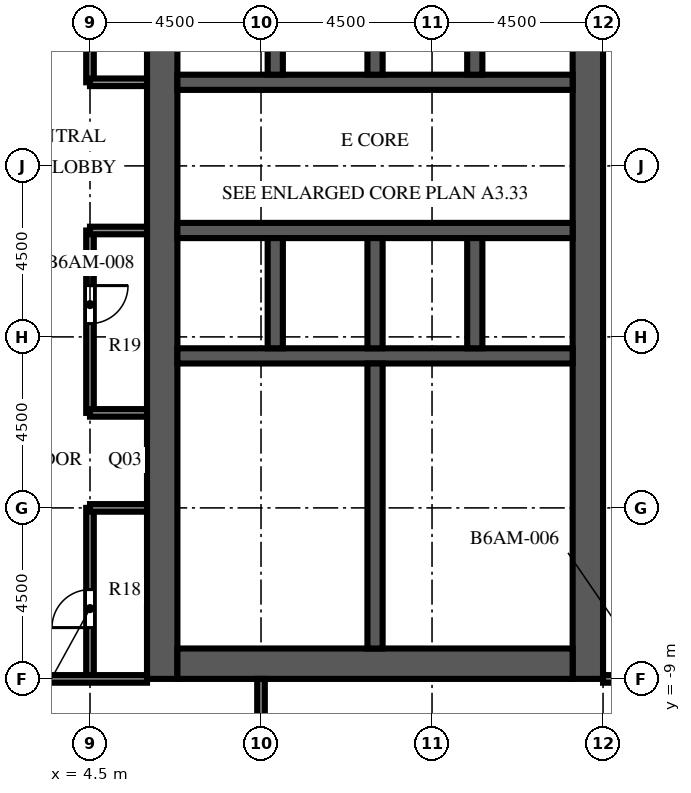
"""IFC4 building model, lengths in metres.
Left out: names, types, materials, properties, quantities, classifications, styles, units other than length and angle.
Written with IfcOpenShell. Run it as: python <this file> out.ifc"""

import sys

from ifc_helpers import new_model, si_unit, direction, frame, frame_2d, origin, place, context, subcontext, project, spatial, rectangle, extrude, element, fill, save


model = new_model("IFC4")
c1 = context("Model", 3, precision=1e-05, world=origin(), true_north=direction((0.0, 1.0)))
c2 = subcontext(c1, "Body", "Model", "MODEL_VIEW")
j1 = project(units=[si_unit("LENGTHUNIT", "METRE"), si_unit("PLANEANGLEUNIT", "RADIAN")], contexts=[c1])
p1 = place(None, origin())
s1 = spatial("IfcSite", under=j1, at=p1, CompositionType="ELEMENT")
p2 = place(p1, origin())
s2 = spatial("IfcBuilding", under=s1, at=p2, CompositionType="ELEMENT")
p3 = place(p2, frame((0.0, 0.0, 220.2)))
s3 = spatial("IfcBuildingStorey", under=s2, at=p3, CompositionType="ELEMENT", Elevation=220.2)
p4 = place(p3, frame((6.4, -9.0, 0.0), z_axis=(0.0, 0.0, 1.0), x_axis=(0.0, 1.0, 0.0)))
e1 = element("IfcWall", 1, at=p4, inside=s3, PredefinedType="SHEAR", context=c2, shape_type="SweptSolid", body=[
    extrude(rectangle(XDim=27.5, YDim=0.8, at=frame_2d((13.75, 0.0))), origin(), (0.0, 0.0, 1.0), 6.0),
])
p5 = place(p4, frame((12.55, 0.0, 0.0)))
e2 = element("IfcOpeningElement", 2, at=p5, cuts=e1, PredefinedType="OPENING", context=c2, shape_type="SweptSolid", body=[
    extrude(rectangle(XDim=2.4, YDim=2.4, at=frame_2d((1.2, 1.2))), frame((0.0, 0.41, 0.0), z_axis=(0.0, -1.0, 0.0), x_axis=(1.0, 0.0, 0.0)), (0.0, 0.0, 1.0), 0.82),
])
p6 = place(p4, frame((5.5, 0.0, 0.0)))
e3 = element("IfcOpeningElement", 3, at=p6, cuts=e1, PredefinedType="OPENING", context=c2, shape_type="SweptSolid", body=[
    extrude(rectangle(XDim=0.95, YDim=2.1, at=frame_2d((0.475, 1.05))), frame((0.0, 0.41, 0.0), z_axis=(0.0, -1.0, 0.0), x_axis=(1.0, 0.0, 0.0)), (0.0, 0.0, 1.0), 0.82),
])
p7 = place(p4, frame((23.475, 0.0, 0.0)))
e4 = element("IfcOpeningElement", 4, at=p7, cuts=e1, PredefinedType="OPENING", context=c2, shape_type="SweptSolid", body=[
    extrude(rectangle(XDim=1.2, YDim=2.1, at=frame_2d((0.6, 1.05))), frame((0.0, 0.41, 0.0), z_axis=(0.0, -1.0, 0.0), x_axis=(1.0, 0.0, 0.0)), (0.0, 0.0, 1.0), 0.82),
])
p8 = place(p3, frame((17.6, -9.0, 0.0), z_axis=(0.0, 0.0, 1.0), x_axis=(0.0, 1.0, 0.0)))
e5 = element("IfcWall", 5, at=p8, inside=s3, PredefinedType="SHEAR", context=c2, shape_type="SweptSolid", body=[
    extrude(rectangle(XDim=27.5, YDim=0.8, at=frame_2d((13.75, 0.0))), origin(), (0.0, 0.0, 1.0), 6.0),
])
p9 = place(p8, frame((12.55, 0.0, 0.0)))
e6 = element("IfcOpeningElement", 6, at=p9, cuts=e5, PredefinedType="OPENING", context=c2, shape_type="SweptSolid", body=[
    extrude(rectangle(XDim=2.4, YDim=2.4, at=frame_2d((1.2, 1.2))), frame((0.0, 0.41, 0.0), z_axis=(0.0, -1.0, 0.0), x_axis=(1.0, 0.0, 0.0)), (0.0, 0.0, 1.0), 0.82),
])
p10 = place(p8, frame((6.825, 0.0, 0.0)))
e7 = element("IfcOpeningElement", 7, at=p10, cuts=e5, PredefinedType="OPENING", context=c2, shape_type="SweptSolid", body=[
    extrude(rectangle(XDim=1.2, YDim=2.1, at=frame_2d((0.6, 1.05))), frame((0.0, 0.41, 0.0), z_axis=(0.0, -1.0, 0.0), x_axis=(1.0, 0.0, 0.0)), (0.0, 0.0, 1.0), 0.82),
])
p11 = place(p8, frame((19.475, 0.0, 0.0)))
e8 = element("IfcOpeningElement", 8, at=p11, cuts=e5, PredefinedType="OPENING", context=c2, shape_type="SweptSolid", body=[
    extrude(rectangle(XDim=1.2, YDim=2.1, at=frame_2d((0.6, 1.05))), frame((0.0, 0.41, 0.0), z_axis=(0.0, -1.0, 0.0), x_axis=(1.0, 0.0, 0.0)), (0.0, 0.0, 1.0), 0.82),
])
p12 = place(p3, frame((6.8, -8.6, 0.0), z_axis=(0.0, 0.0, 1.0), x_axis=(1.0, 0.0, 0.0)))
e9 = element("IfcWall", 9, at=p12, inside=s3, PredefinedType="SHEAR", context=c2, shape_type="SweptSolid", body=[
    extrude(rectangle(XDim=10.4, YDim=0.8, at=frame_2d((5.2, 0.0))), origin(), (0.0, 0.0, 1.0), 6.0),
])
p13 = place(p3, frame((6.8, -0.5, 0.0), z_axis=(0.0, 0.0, 1.0), x_axis=(1.0, 0.0, 0.0)))
e10 = element("IfcWall", 10, at=p13, inside=s3, PredefinedType="SHEAR", context=c2, shape_type="SweptSolid", body=[
    extrude(rectangle(XDim=10.4, YDim=0.4, at=frame_2d((5.2, 0.0))), origin(), (0.0, 0.0, 1.0), 6.0),
])
p14 = place(p3, frame((6.8, 2.8, 0.0), z_axis=(0.0, 0.0, 1.0), x_axis=(1.0, 0.0, 0.0)))
e11 = element("IfcWall", 11, at=p14, inside=s3, PredefinedType="SHEAR", context=c2, shape_type="SweptSolid", body=[
    extrude(rectangle(XDim=10.4, YDim=0.4, at=frame_2d((5.2, 0.0))), origin(), (0.0, 0.0, 1.0), 6.0),
])
p15 = place(p14, frame((0.738, 0.0, 0.0)))
e12 = element("IfcOpeningElement", 12, at=p15, cuts=e11, PredefinedType="OPENING", context=c2, shape_type="SweptSolid", body=[
    extrude(rectangle(XDim=1.1, YDim=2.1, at=frame_2d((0.55, 1.05))), frame((0.0, 0.21, 0.0), z_axis=(0.0, -1.0, 0.0), x_axis=(1.0, 0.0, 0.0)), (0.0, 0.0, 1.0), 0.42),
])
p16 = place(p14, frame((3.337, 0.0, 0.0)))
e13 = element("IfcOpeningElement", 13, at=p16, cuts=e11, PredefinedType="OPENING", context=c2, shape_type="SweptSolid", body=[
    extrude(rectangle(XDim=1.1, YDim=2.1, at=frame_2d((0.55, 1.05))), frame((0.0, 0.21, 0.0), z_axis=(0.0, -1.0, 0.0), x_axis=(1.0, 0.0, 0.0)), (0.0, 0.0, 1.0), 0.42),
])
p17 = place(p14, frame((6.012, 0.0, 0.0)))
e14 = element("IfcOpeningElement", 14, at=p17, cuts=e11, PredefinedType="OPENING", context=c2, shape_type="SweptSolid", body=[
    extrude(rectangle(XDim=1.0, YDim=2.1, at=frame_2d((0.5, 1.05))), frame((0.0, 0.21, 0.0), z_axis=(0.0, -1.0, 0.0), x_axis=(1.0, 0.0, 0.0)), (0.0, 0.0, 1.0), 0.42),
])
p18 = place(p14, frame((8.613, 0.0, 0.0)))
e15 = element("IfcOpeningElement", 15, at=p18, cuts=e11, PredefinedType="OPENING", context=c2, shape_type="SweptSolid", body=[
    extrude(rectangle(XDim=1.0, YDim=2.1, at=frame_2d((0.5, 1.05))), frame((0.0, 0.21, 0.0), z_axis=(0.0, -1.0, 0.0), x_axis=(1.0, 0.0, 0.0)), (0.0, 0.0, 1.0), 0.42),
])
p19 = place(p3, frame((6.8, 6.7, 0.0), z_axis=(0.0, 0.0, 1.0), x_axis=(1.0, 0.0, 0.0)))
e16 = element("IfcWall", 16, at=p19, inside=s3, PredefinedType="SHEAR", context=c2, shape_type="SweptSolid", body=[
    extrude(rectangle(XDim=10.4, YDim=0.4, at=frame_2d((5.2, 0.0))), origin(), (0.0, 0.0, 1.0), 6.0),
])
p20 = place(p19, frame((3.337, 0.0, 0.0)))
e17 = element("IfcOpeningElement", 17, at=p20, cuts=e16, PredefinedType="OPENING", context=c2, shape_type="SweptSolid", body=[
    extrude(rectangle(XDim=1.1, YDim=2.1, at=frame_2d((0.55, 1.05))), frame((0.0, 0.21, 0.0), z_axis=(0.0, -1.0, 0.0), x_axis=(1.0, 0.0, 0.0)), (0.0, 0.0, 1.0), 0.42),
])
p21 = place(p19, frame((5.962, 0.0, 0.0)))
e18 = element("IfcOpeningElement", 18, at=p21, cuts=e16, PredefinedType="OPENING", context=c2, shape_type="SweptSolid", body=[
    extrude(rectangle(XDim=1.1, YDim=2.1, at=frame_2d((0.55, 1.05))), frame((0.0, 0.21, 0.0), z_axis=(0.0, -1.0, 0.0), x_axis=(1.0, 0.0, 0.0)), (0.0, 0.0, 1.0), 0.42),
])
p22 = place(p19, frame((8.663, 0.0, 0.0)))
e19 = element("IfcOpeningElement", 19, at=p22, cuts=e16, PredefinedType="OPENING", context=c2, shape_type="SweptSolid", body=[
    extrude(rectangle(XDim=1.1, YDim=2.1, at=frame_2d((0.55, 1.05))), frame((0.0, 0.21, 0.0), z_axis=(0.0, -1.0, 0.0), x_axis=(1.0, 0.0, 0.0)), (0.0, 0.0, 1.0), 0.42),
])
p23 = place(p19, frame((0.688, 0.0, 0.0)))
e20 = element("IfcOpeningElement", 20, at=p23, cuts=e16, PredefinedType="OPENING", context=c2, shape_type="SweptSolid", body=[
    extrude(rectangle(XDim=1.0, YDim=2.1, at=frame_2d((0.5, 1.05))), frame((0.0, 0.21, 0.0), z_axis=(0.0, -1.0, 0.0), x_axis=(1.0, 0.0, 0.0)), (0.0, 0.0, 1.0), 0.42),
])
for number, where, z_axis, x_axis in (
    (21, (9.375, -0.3, 0.0), (0.0, 0.0, 1.0), (0.0, 1.0, 0.0)),
    (22, (9.375, 6.9, 0.0), (0.0, 0.0, 1.0), (0.0, 1.0, 0.0)),
    (23, (12.0, -0.3, 0.0), (0.0, 0.0, 1.0), (0.0, 1.0, 0.0)),
    (24, (12.0, 6.9, 0.0), (0.0, 0.0, 1.0), (0.0, 1.0, 0.0)),
    (25, (14.625, -0.3, 0.0), (0.0, 0.0, 1.0), (0.0, 1.0, 0.0)),
    (26, (14.625, 6.9, 0.0), (0.0, 0.0, 1.0), (0.0, 1.0, 0.0)),
):
    element("IfcWall", number, at=place(p3, frame(where, z_axis=z_axis, x_axis=x_axis)), inside=s3, PredefinedType="SHEAR", context=c2, shape_type="SweptSolid", body=[
        extrude(rectangle(XDim=2.9, YDim=0.4, at=frame_2d((1.45, 0.0))), origin(), (0.0, 0.0, 1.0), 6.0),
    ])
p24 = place(p3, frame((12.0, -8.2, 0.0), z_axis=(0.0, 0.0, 1.0), x_axis=(0.0, 1.0, 0.0)))
e27 = element("IfcWall", 27, at=p24, inside=s3, PredefinedType="SHEAR", context=c2, shape_type="SweptSolid", body=[
    extrude(rectangle(XDim=7.5, YDim=0.4, at=frame_2d((3.75, 0.0))), origin(), (0.0, 0.0, 1.0), 6.0),
])
p25 = place(p3, frame((6.8, -3.7, 0.0), z_axis=(0.0, 0.0, 1.0), x_axis=(1.0, 0.0, 0.0)))
e28 = element("IfcWall", 28, at=p25, inside=s3, PredefinedType="PARTITIONING", context=c2, shape_type="SweptSolid", body=[
    extrude(rectangle(XDim=2.5, YDim=0.1, at=frame_2d((1.25, 0.0))), origin(), (0.0, 0.0, 1.0), 5.4),
])
p26 = place(p25, frame((0.75, 0.0, 0.0)))
e29 = element("IfcOpeningElement", 29, at=p26, cuts=e28, PredefinedType="OPENING", context=c2, shape_type="SweptSolid", body=[
    extrude(rectangle(XDim=1.0, YDim=2.1, at=frame_2d((0.5, 1.05))), frame((0.0, 0.06, 0.0), z_axis=(0.0, -1.0, 0.0), x_axis=(1.0, 0.0, 0.0)), (0.0, 0.0, 1.0), 0.12),
])
p27 = place(p3, frame((9.3, -3.7, 0.0), z_axis=(0.0, 0.0, 1.0), x_axis=(1.0, 0.0, 0.0)))
e30 = element("IfcWall", 30, at=p27, inside=s3, PredefinedType="PARTITIONING", context=c2, shape_type="SweptSolid", body=[
    extrude(rectangle(XDim=2.5, YDim=0.1, at=frame_2d((1.25, 0.0))), origin(), (0.0, 0.0, 1.0), 5.4),
])
p28 = place(p27, frame((0.75, 0.0, 0.0)))
e31 = element("IfcOpeningElement", 31, at=p28, cuts=e30, PredefinedType="OPENING", context=c2, shape_type="SweptSolid", body=[
    extrude(rectangle(XDim=1.0, YDim=2.1, at=frame_2d((0.5, 1.05))), frame((0.0, 0.06, 0.0), z_axis=(0.0, -1.0, 0.0), x_axis=(1.0, 0.0, 0.0)), (0.0, 0.0, 1.0), 0.12),
])
p29 = place(p3, frame((6.8, -2.35, 0.0), z_axis=(0.0, 0.0, 1.0), x_axis=(1.0, 0.0, 0.0)))
e32 = element("IfcWall", 32, at=p29, inside=s3, PredefinedType="PARTITIONING", context=c2, shape_type="SweptSolid", body=[
    extrude(rectangle(XDim=2.5, YDim=0.1, at=frame_2d((1.25, 0.0))), origin(), (0.0, 0.0, 1.0), 5.4),
])
p30 = place(p29, frame((0.75, 0.0, 0.0)))
e33 = element("IfcOpeningElement", 33, at=p30, cuts=e32, PredefinedType="OPENING", context=c2, shape_type="SweptSolid", body=[
    extrude(rectangle(XDim=1.0, YDim=2.1, at=frame_2d((0.5, 1.05))), frame((0.0, 0.06, 0.0), z_axis=(0.0, -1.0, 0.0), x_axis=(1.0, 0.0, 0.0)), (0.0, 0.0, 1.0), 0.12),
])
p31 = place(p3, frame((9.3, -2.35, 0.0), z_axis=(0.0, 0.0, 1.0), x_axis=(1.0, 0.0, 0.0)))
e34 = element("IfcWall", 34, at=p31, inside=s3, PredefinedType="PARTITIONING", context=c2, shape_type="SweptSolid", body=[
    extrude(rectangle(XDim=2.5, YDim=0.1, at=frame_2d((1.25, 0.0))), origin(), (0.0, 0.0, 1.0), 5.4),
])
p32 = place(p31, frame((0.75, 0.0, 0.0)))
e35 = element("IfcOpeningElement", 35, at=p32, cuts=e34, PredefinedType="OPENING", context=c2, shape_type="SweptSolid", body=[
    extrude(rectangle(XDim=1.0, YDim=2.1, at=frame_2d((0.5, 1.05))), frame((0.0, 0.06, 0.0), z_axis=(0.0, -1.0, 0.0), x_axis=(1.0, 0.0, 0.0)), (0.0, 0.0, 1.0), 0.12),
])
p33 = place(p3, frame((9.3, -8.2, 0.0), z_axis=(0.0, 0.0, 1.0), x_axis=(0.0, 1.0, 0.0)))
e36 = element("IfcWall", 36, at=p33, inside=s3, PredefinedType="PARTITIONING", context=c2, shape_type="SweptSolid", body=[
    extrude(rectangle(XDim=4.5, YDim=0.1, at=frame_2d((2.25, 0.0))), origin(), (0.0, 0.0, 1.0), 5.4),
])
p34 = place(p3, frame((9.3, -2.35, 0.0), z_axis=(0.0, 0.0, 1.0), x_axis=(0.0, 1.0, 0.0)))
e37 = element("IfcWall", 37, at=p34, inside=s3, PredefinedType="PARTITIONING", context=c2, shape_type="SweptSolid", body=[
    extrude(rectangle(XDim=1.65, YDim=0.1, at=frame_2d((0.825, 0.0))), origin(), (0.0, 0.0, 1.0), 5.4),
])
p35 = place(p3, frame((4.5, -4.5, 0.0), z_axis=(0.0, 0.0, 1.0), x_axis=(0.0, -1.0, 0.0)))
e38 = element("IfcWall", 38, at=p35, inside=s3, PredefinedType="PARTITIONING", context=c2, shape_type="SweptSolid", body=[
    extrude(rectangle(XDim=4.5, YDim=0.2, at=frame_2d((2.25, 0.0))), origin(), (0.0, 0.0, 1.0), 5.4),
])
p36 = place(p35, frame((2.15, 0.0, 0.0)))
e39 = element("IfcOpeningElement", 39, at=p36, cuts=e38, PredefinedType="OPENING", context=c2, shape_type="SweptSolid", body=[
    extrude(rectangle(XDim=1.0, YDim=2.1, at=frame_2d((0.5, 1.05))), frame((0.0, 0.11, 0.0), z_axis=(0.0, -1.0, 0.0), x_axis=(1.0, 0.0, 0.0)), (0.0, 0.0, 1.0), 0.22),
])
p37 = place(p3, frame((4.5, 2.8, 0.0), z_axis=(0.0, 0.0, 1.0), x_axis=(0.0, -1.0, 0.0)))
e40 = element("IfcWall", 40, at=p37, inside=s3, PredefinedType="PARTITIONING", context=c2, shape_type="SweptSolid", body=[
    extrude(rectangle(XDim=4.8, YDim=0.2, at=frame_2d((2.4, 0.0))), origin(), (0.0, 0.0, 1.0), 5.4),
])
p38 = place(p37, frame((1.45, 0.0, 0.0)))
e41 = element("IfcOpeningElement", 41, at=p38, cuts=e40, PredefinedType="OPENING", context=c2, shape_type="SweptSolid", body=[
    extrude(rectangle(XDim=1.0, YDim=2.1, at=frame_2d((0.5, 1.05))), frame((0.0, 0.11, 0.0), z_axis=(0.0, -1.0, 0.0), x_axis=(1.0, 0.0, 0.0)), (0.0, 0.0, 1.0), 0.22),
])
p39 = place(p3, frame((4.5, 18.5, 0.0), z_axis=(0.0, 0.0, 1.0), x_axis=(0.0, -1.0, 0.0)))
e42 = element("IfcWall", 42, at=p39, inside=s3, PredefinedType="PARTITIONING", context=c2, shape_type="SweptSolid", body=[
    extrude(rectangle(XDim=11.8, YDim=0.2, at=frame_2d((5.9, 0.0))), origin(), (0.0, 0.0, 1.0), 5.4),
])
p40 = place(p39, frame((5.95, 0.0, 0.0)))
e43 = element("IfcOpeningElement", 43, at=p40, cuts=e42, PredefinedType="OPENING", context=c2, shape_type="SweptSolid", body=[
    extrude(rectangle(XDim=1.0, YDim=2.1, at=frame_2d((0.5, 1.05))), frame((0.0, 0.11, 0.0), z_axis=(0.0, -1.0, 0.0), x_axis=(1.0, 0.0, 0.0)), (0.0, 0.0, 1.0), 0.22),
])
p41 = place(p3, frame((9.0, -17.4, 0.0), z_axis=(0.0, 0.0, 1.0), x_axis=(0.0, 1.0, 0.0)))
e44 = element("IfcWall", 44, at=p41, inside=s3, PredefinedType="PARTITIONING", context=c2, shape_type="SweptSolid", body=[
    extrude(rectangle(XDim=8.4, YDim=0.2, at=frame_2d((4.2, 0.0))), origin(), (0.0, 0.0, 1.0), 5.4),
])
p42 = place(p3, frame((1.5, -9.0, 0.0), z_axis=(0.0, 0.0, 1.0), x_axis=(1.0, 0.0, 0.0)))
e45 = element("IfcWall", 45, at=p42, inside=s3, PredefinedType="PARTITIONING", context=c2, shape_type="SweptSolid", body=[
    extrude(rectangle(XDim=4.5, YDim=0.2, at=frame_2d((2.25, 0.0))), origin(), (0.0, 0.0, 1.0), 5.4),
])
p43 = place(p3, frame((21.0, -9.0, 0.0), z_axis=(0.0, 0.0, 1.0), x_axis=(-1.0, 0.0, 0.0)))
e46 = element("IfcWall", 46, at=p43, inside=s3, PredefinedType="PARTITIONING", context=c2, shape_type="SweptSolid", body=[
    extrude(rectangle(XDim=3.0, YDim=0.2, at=frame_2d((1.5, 0.0))), origin(), (0.0, 0.0, 1.0), 5.4),
])
p44 = place(p43, frame((1.15, 0.0, 0.0)))
e47 = element("IfcOpeningElement", 47, at=p44, cuts=e46, PredefinedType="OPENING", context=c2, shape_type="SweptSolid", body=[
    extrude(rectangle(XDim=1.0, YDim=2.1, at=frame_2d((0.5, 1.05))), frame((0.0, 0.11, 0.0), z_axis=(0.0, -1.0, 0.0), x_axis=(1.0, 0.0, 0.0)), (0.0, 0.0, 1.0), 0.22),
])
for number, where, z_axis, x_axis in (
    (48, (4.5, -4.5, 0.0), (0.0, 0.0, 1.0), (1.0, 0.0, 0.0)),
    (49, (4.5, -2.0, 0.0), (0.0, 0.0, 1.0), (1.0, 0.0, 0.0)),
    (50, (4.5, 2.8, 0.0), (0.0, 0.0, 1.0), (1.0, 0.0, 0.0)),
    (51, (4.5, 6.7, 0.0), (0.0, 0.0, 1.0), (1.0, 0.0, 0.0)),
):
    element("IfcWall", number, at=place(p3, frame(where, z_axis=z_axis, x_axis=x_axis)), inside=s3, PredefinedType="PARTITIONING", context=c2, shape_type="SweptSolid", body=[
        extrude(rectangle(XDim=1.5, YDim=0.2, at=frame_2d((0.75, 0.0))), origin(), (0.0, 0.0, 1.0), 5.4),
    ])
p45 = place(p15, origin())
e52 = element("IfcDoor", 52, at=p45, inside=s3, OperationType="DOUBLE_DOOR_SLIDING", PredefinedType="DOOR", context=c2, shape_type="SweptSolid", body=[
    extrude(rectangle(XDim=1.1, YDim=2.1, at=frame_2d((0.55, 1.05))), frame((0.0, 0.025, 0.0), z_axis=(0.0, -1.0, 0.0), x_axis=(1.0, 0.0, 0.0)), (0.0, 0.0, 1.0), 0.05),
])
fill(e12, e52)
p46 = place(p16, origin())
e53 = element("IfcDoor", 53, at=p46, inside=s3, OperationType="DOUBLE_DOOR_SLIDING", PredefinedType="DOOR", context=c2, shape_type="SweptSolid", body=[
    extrude(rectangle(XDim=1.1, YDim=2.1, at=frame_2d((0.55, 1.05))), frame((0.0, 0.025, 0.0), z_axis=(0.0, -1.0, 0.0), x_axis=(1.0, 0.0, 0.0)), (0.0, 0.0, 1.0), 0.05),
])
fill(e13, e53)
p47 = place(p20, origin())
e54 = element("IfcDoor", 54, at=p47, inside=s3, OperationType="DOUBLE_DOOR_SLIDING", PredefinedType="DOOR", context=c2, shape_type="SweptSolid", body=[
    extrude(rectangle(XDim=1.1, YDim=2.1, at=frame_2d((0.55, 1.05))), frame((0.0, 0.025, 0.0), z_axis=(0.0, -1.0, 0.0), x_axis=(1.0, 0.0, 0.0)), (0.0, 0.0, 1.0), 0.05),
])
fill(e17, e54)
p48 = place(p21, origin())
e55 = element("IfcDoor", 55, at=p48, inside=s3, OperationType="DOUBLE_DOOR_SLIDING", PredefinedType="DOOR", context=c2, shape_type="SweptSolid", body=[
    extrude(rectangle(XDim=1.1, YDim=2.1, at=frame_2d((0.55, 1.05))), frame((0.0, 0.025, 0.0), z_axis=(0.0, -1.0, 0.0), x_axis=(1.0, 0.0, 0.0)), (0.0, 0.0, 1.0), 0.05),
])
fill(e18, e55)
p49 = place(p22, origin())
e56 = element("IfcDoor", 56, at=p49, inside=s3, OperationType="DOUBLE_DOOR_SLIDING", PredefinedType="DOOR", context=c2, shape_type="SweptSolid", body=[
    extrude(rectangle(XDim=1.1, YDim=2.1, at=frame_2d((0.55, 1.05))), frame((0.0, 0.025, 0.0), z_axis=(0.0, -1.0, 0.0), x_axis=(1.0, 0.0, 0.0)), (0.0, 0.0, 1.0), 0.05),
])
fill(e19, e56)
p50 = place(p5, origin())
e57 = element("IfcDoor", 57, at=p50, inside=s3, OperationType="DOUBLE_DOOR_DOUBLE_SWING", PredefinedType="DOOR", context=c2, shape_type="SweptSolid", body=[
    extrude(rectangle(XDim=2.4, YDim=2.4, at=frame_2d((1.2, 1.2))), frame((0.0, 0.025, 0.0), z_axis=(0.0, -1.0, 0.0), x_axis=(1.0, 0.0, 0.0)), (0.0, 0.0, 1.0), 0.05),
])
fill(e2, e57)
p51 = place(p9, origin())
e58 = element("IfcDoor", 58, at=p51, inside=s3, OperationType="DOUBLE_DOOR_DOUBLE_SWING", PredefinedType="DOOR", context=c2, shape_type="SweptSolid", body=[
    extrude(rectangle(XDim=2.4, YDim=2.4, at=frame_2d((1.2, 1.2))), frame((0.0, 0.025, 0.0), z_axis=(0.0, -1.0, 0.0), x_axis=(1.0, 0.0, 0.0)), (0.0, 0.0, 1.0), 0.05),
])
fill(e6, e58)
p52 = place(p10, frame((1.2, 0.0, 0.0), z_axis=(0.0, 0.0, 1.0), x_axis=(-1.0, 0.0, 0.0)))
e59 = element("IfcDoor", 59, at=p52, inside=s3, OperationType="SINGLE_SWING_LEFT", PredefinedType="DOOR", context=c2, shape_type="SweptSolid", body=[
    extrude(rectangle(XDim=1.2, YDim=2.1, at=frame_2d((0.6, 1.05))), frame((0.0, 0.025, 0.0), z_axis=(0.0, -1.0, 0.0), x_axis=(1.0, 0.0, 0.0)), (0.0, 0.0, 1.0), 0.05),
])
fill(e7, e59)
p53 = place(p17, origin())
e60 = element("IfcDoor", 60, at=p53, inside=s3, OperationType="SINGLE_SWING_LEFT", PredefinedType="DOOR", context=c2, shape_type="SweptSolid", body=[
    extrude(rectangle(XDim=1.0, YDim=2.1, at=frame_2d((0.5, 1.05))), frame((0.0, 0.025, 0.0), z_axis=(0.0, -1.0, 0.0), x_axis=(1.0, 0.0, 0.0)), (0.0, 0.0, 1.0), 0.05),
])
fill(e14, e60)
p54 = place(p18, origin())
e61 = element("IfcDoor", 61, at=p54, inside=s3, OperationType="SINGLE_SWING_RIGHT", PredefinedType="DOOR", context=c2, shape_type="SweptSolid", body=[
    extrude(rectangle(XDim=1.0, YDim=2.1, at=frame_2d((0.5, 1.05))), frame((0.0, 0.025, 0.0), z_axis=(0.0, -1.0, 0.0), x_axis=(1.0, 0.0, 0.0)), (0.0, 0.0, 1.0), 0.05),
])
fill(e15, e61)
p55 = place(p23, origin())
e62 = element("IfcDoor", 62, at=p55, inside=s3, OperationType="SINGLE_SWING_LEFT", PredefinedType="DOOR", context=c2, shape_type="SweptSolid", body=[
    extrude(rectangle(XDim=1.0, YDim=2.1, at=frame_2d((0.5, 1.05))), frame((0.0, 0.025, 0.0), z_axis=(0.0, -1.0, 0.0), x_axis=(1.0, 0.0, 0.0)), (0.0, 0.0, 1.0), 0.05),
])
fill(e20, e62)
p56 = place(p6, origin())
e63 = element("IfcDoor", 63, at=p56, inside=s3, OperationType="SINGLE_SWING_RIGHT", PredefinedType="DOOR", context=c2, shape_type="SweptSolid", body=[
    extrude(rectangle(XDim=0.95, YDim=2.1, at=frame_2d((0.475, 1.05))), frame((0.0, -0.325, 0.0), z_axis=(0.0, -1.0, 0.0), x_axis=(1.0, 0.0, 0.0)), (0.0, 0.0, 1.0), 0.05),
])
fill(e3, e63)
p57 = place(p26, origin())
e64 = element("IfcDoor", 64, at=p57, inside=s3, OperationType="SINGLE_SWING_LEFT", PredefinedType="DOOR", context=c2, shape_type="SweptSolid", body=[
    extrude(rectangle(XDim=1.0, YDim=2.1, at=frame_2d((0.5, 1.05))), frame((0.0, 0.025, 0.0), z_axis=(0.0, -1.0, 0.0), x_axis=(1.0, 0.0, 0.0)), (0.0, 0.0, 1.0), 0.05),
])
fill(e29, e64)
p58 = place(p28, origin())
e65 = element("IfcDoor", 65, at=p58, inside=s3, OperationType="SINGLE_SWING_RIGHT", PredefinedType="DOOR", context=c2, shape_type="SweptSolid", body=[
    extrude(rectangle(XDim=1.0, YDim=2.1, at=frame_2d((0.5, 1.05))), frame((0.0, 0.025, 0.0), z_axis=(0.0, -1.0, 0.0), x_axis=(1.0, 0.0, 0.0)), (0.0, 0.0, 1.0), 0.05),
])
fill(e31, e65)
p59 = place(p30, origin())
e66 = element("IfcDoor", 66, at=p59, inside=s3, OperationType="SINGLE_SWING_LEFT", PredefinedType="DOOR", context=c2, shape_type="SweptSolid", body=[
    extrude(rectangle(XDim=1.0, YDim=2.1, at=frame_2d((0.5, 1.05))), frame((0.0, 0.025, 0.0), z_axis=(0.0, -1.0, 0.0), x_axis=(1.0, 0.0, 0.0)), (0.0, 0.0, 1.0), 0.05),
])
fill(e33, e66)
p60 = place(p32, origin())
e67 = element("IfcDoor", 67, at=p60, inside=s3, OperationType="SINGLE_SWING_RIGHT", PredefinedType="DOOR", context=c2, shape_type="SweptSolid", body=[
    extrude(rectangle(XDim=1.0, YDim=2.1, at=frame_2d((0.5, 1.05))), frame((0.0, 0.025, 0.0), z_axis=(0.0, -1.0, 0.0), x_axis=(1.0, 0.0, 0.0)), (0.0, 0.0, 1.0), 0.05),
])
fill(e35, e67)
p61 = place(p36, origin())
e68 = element("IfcDoor", 68, at=p61, inside=s3, OperationType="SINGLE_SWING_RIGHT", PredefinedType="DOOR", context=c2, shape_type="SweptSolid", body=[
    extrude(rectangle(XDim=1.0, YDim=2.1, at=frame_2d((0.5, 1.05))), frame((0.0, 0.025, 0.0), z_axis=(0.0, -1.0, 0.0), x_axis=(1.0, 0.0, 0.0)), (0.0, 0.0, 1.0), 0.05),
])
fill(e39, e68)
p62 = place(p38, origin())
e69 = element("IfcDoor", 69, at=p62, inside=s3, OperationType="SINGLE_SWING_LEFT", PredefinedType="DOOR", context=c2, shape_type="SweptSolid", body=[
    extrude(rectangle(XDim=1.0, YDim=2.1, at=frame_2d((0.5, 1.05))), frame((0.0, 0.025, 0.0), z_axis=(0.0, -1.0, 0.0), x_axis=(1.0, 0.0, 0.0)), (0.0, 0.0, 1.0), 0.05),
])
fill(e41, e69)
save(model, sys.argv[1])
